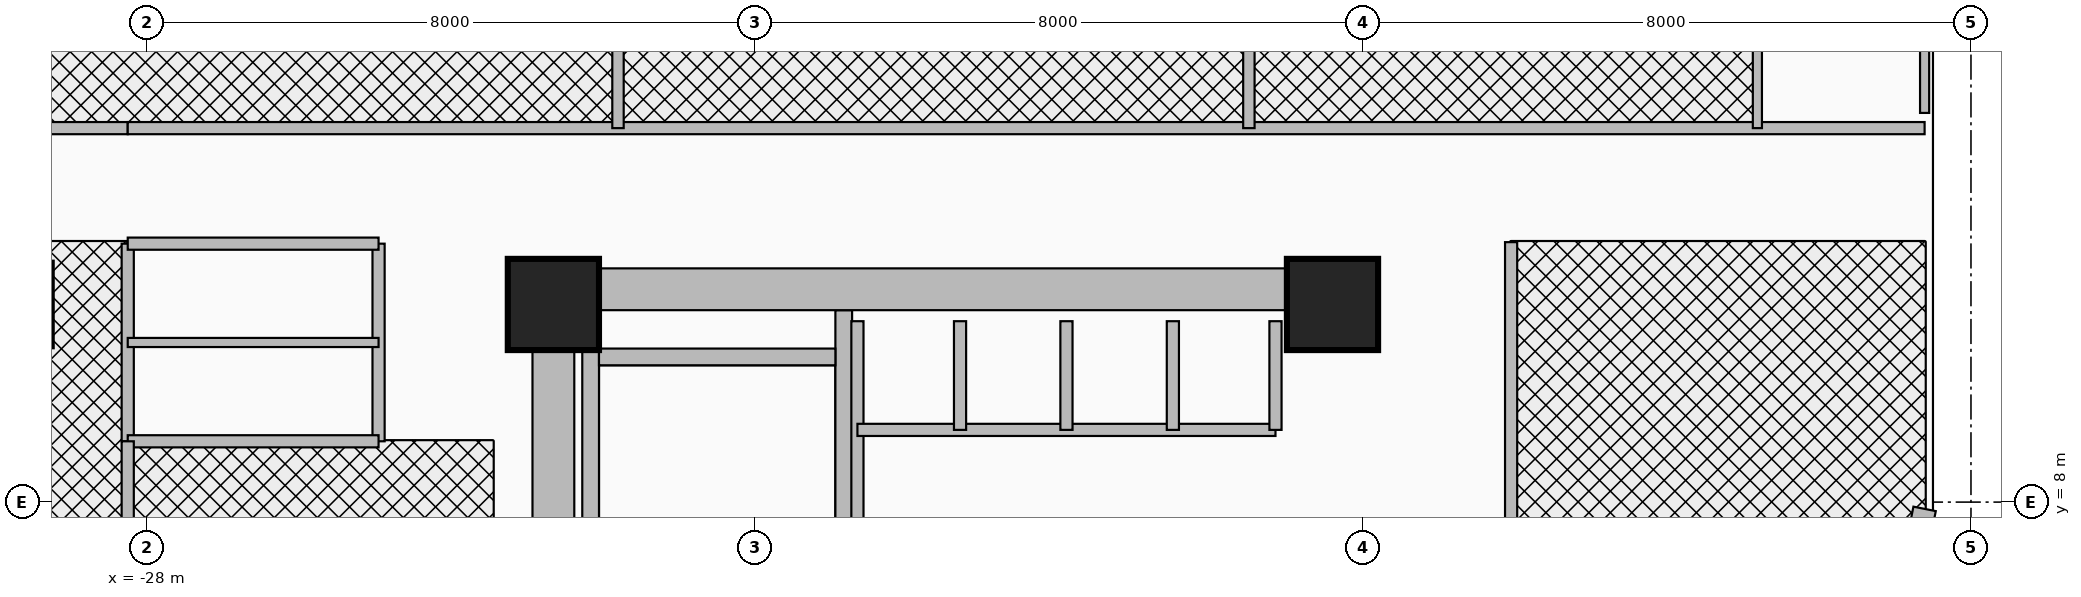
"""IFC4 building model, lengths in metres.
Left out: names, types, materials, properties, quantities, classifications, styles, units other than length and angle.
Written with IfcOpenShell. Run it as: python <this file> out.ifc"""

import sys

from ifc_helpers import new_model, si_unit, direction, frame, frame_2d, origin, origin_2d, place, context, subcontext, project, spatial, rectangle, extrude, source, transform, mapped, element, fill, save


model = new_model("IFC4")
c1 = context("Model", 3, precision=1e-05, world=origin(), true_north=direction((0.0, 1.0)))
c2 = subcontext(c1, "Body", "Model", "MODEL_VIEW")
j1 = project(units=[si_unit("LENGTHUNIT", "METRE"), si_unit("PLANEANGLEUNIT", "RADIAN")], contexts=[c1])
p1 = place(None, origin())
s1 = spatial("IfcSite", under=j1, at=p1, CompositionType="ELEMENT")
p2 = place(p1, origin())
s2 = spatial("IfcBuilding", under=s1, at=p2, CompositionType="ELEMENT")
p3 = place(p2, frame((0.0, 0.0, 153.8)))
s3 = spatial("IfcBuildingStorey", under=s2, at=p3, CompositionType="ELEMENT", Elevation=153.8)
for number, where, z_axis, x_axis in (
    (1, (-22.16, 1.78, 0.0), (0.0, 0.0, 1.0), (0.0, 1.0, 0.0)),
    (2, (-18.83, 1.78, 0.0), (0.0, 0.0, 1.0), (0.0, 1.0, 0.0)),
):
    element("IfcWall", number, at=place(p3, frame(where, z_axis=z_axis, x_axis=x_axis)), inside=s3, PredefinedType="SHEAR", context=c2, shape_type="SweptSolid", body=[
        extrude(rectangle(XDim=8.745, YDim=0.22, at=frame_2d((4.373, 0.0))), origin(), (0.0, 0.0, 1.0), 3.46),
    ])
p4 = place(p3, frame((-22.05, 9.91, 0.0), z_axis=(0.0, 0.0, 1.0), x_axis=(1.0, 0.0, 0.0)))
e3 = element("IfcWall", 3, at=p4, inside=s3, PredefinedType="SHEAR", context=c2, shape_type="SweptSolid", body=[
    extrude(rectangle(XDim=3.11, YDim=0.22, at=frame_2d((1.555, 0.0))), origin(), (0.0, 0.0, 1.0), 3.46),
])
p5 = place(p3, frame((-22.65, -11.075, 0.0), z_axis=(0.0, 0.0, 1.0), x_axis=(0.0, 1.0, 0.0)))
e4 = element("IfcWall", 4, at=p5, inside=s3, PredefinedType="SHEAR", context=c2, shape_type="SweptSolid", body=[
    extrude(rectangle(XDim=22.15, YDim=0.55, at=frame_2d((11.075, 0.0))), origin(), (0.0, 0.0, 1.0), 3.46),
])
p6 = place(p3, frame((-22.65, 10.8, 0.0), z_axis=(0.0, 0.0, 1.0), x_axis=(1.0, 0.0, 0.0)))
e5 = element("IfcWall", 5, at=p6, inside=s3, PredefinedType="SHEAR", context=c2, shape_type="SweptSolid", body=[
    extrude(rectangle(XDim=10.25, YDim=0.55, at=frame_2d((5.125, 0.0))), origin(), (0.0, 0.0, 1.0), 3.46),
])
m1 = source(origin(), c2, "Body", "SweptSolid", [
    extrude(rectangle(XDim=1.2, YDim=1.2, at=origin_2d()), origin(), (0.0, 0.0, 1.0), 3.7),
])
for number, where, z_axis, x_axis in (
    (6, (-22.65, 10.6, 0.0), (0.0, 0.0, 1.0), (1.0, 0.0, 0.0)),
    (7, (-12.4, 10.6, 0.0), (0.0, 0.0, 1.0), (1.0, 0.0, 0.0)),
):
    element("IfcColumn", number, at=place(p3, frame(where, z_axis=z_axis, x_axis=x_axis)), inside=s3, PredefinedType="COLUMN", context=c2, shape_type="MappedRepresentation", body=[
        mapped(m1, transform((0.0, 0.0, 0.0), x_axis=(1.0, 0.0, 0.0), y_axis=(0.0, 1.0, 0.0), z_axis=(0.0, 0.0, 1.0), scale=1.0)),
    ])
p7 = place(p3, frame((-4.61, 7.911, 0.0), z_axis=(0.0, 0.0, 1.0), x_axis=(-0.194989739953, -0.980805282058, 0.0)))
e8 = element("IfcWall", 8, at=p7, inside=s3, PredefinedType="SOLIDWALL", context=c2, shape_type="SweptSolid", body=[
    extrude(rectangle(XDim=0.709, YDim=0.3, at=frame_2d((0.354, 0.0))), origin(), (0.0, 0.0, 1.0), 3.46),
])
p8 = place(p3, frame((-18.65, 7.45, 0.0), z_axis=(0.0, 0.0, 1.0), x_axis=(0.0, 1.0, 0.0)))
e9 = element("IfcWall", 9, at=p8, inside=s3, PredefinedType="PARTITIONING", context=c2, shape_type="SweptSolid", body=[
    extrude(rectangle(XDim=2.93, YDim=0.16, at=frame_2d((1.465, 0.0))), origin(), (0.0, 0.0, 1.0), 3.46),
])
p9 = place(p3, frame((-18.65, 8.95, 0.0), z_axis=(0.0, 0.0, 1.0), x_axis=(1.0, 0.0, 0.0)))
e10 = element("IfcWall", 10, at=p9, inside=s3, PredefinedType="PARTITIONING", context=c2, shape_type="SweptSolid", body=[
    extrude(rectangle(XDim=5.5, YDim=0.16, at=frame_2d((2.75, 0.0))), origin(), (0.0, 0.0, 1.0), 3.46),
])
p10 = place(p9, frame((0.3, 0.0, 0.0)))
e11 = element("IfcOpeningElement", 11, at=p10, cuts=e10, PredefinedType="OPENING", context=c2, shape_type="SweptSolid", body=[
    extrude(rectangle(XDim=0.85, YDim=2.05, at=frame_2d((0.425, 1.025))), frame((0.0, 0.095, 0.0), z_axis=(0.0, -1.0, 0.0), x_axis=(1.0, 0.0, 0.0)), (0.0, 0.0, 1.0), 0.19),
])
p11 = place(p9, frame((1.55, 0.0, 0.0)))
e12 = element("IfcOpeningElement", 12, at=p11, cuts=e10, PredefinedType="OPENING", context=c2, shape_type="SweptSolid", body=[
    extrude(rectangle(XDim=0.85, YDim=2.05, at=frame_2d((0.425, 1.025))), frame((0.0, 0.095, 0.0), z_axis=(0.0, -1.0, 0.0), x_axis=(1.0, 0.0, 0.0)), (0.0, 0.0, 1.0), 0.19),
])
p12 = place(p9, frame((2.95, 0.0, 0.0)))
e13 = element("IfcOpeningElement", 13, at=p12, cuts=e10, PredefinedType="OPENING", context=c2, shape_type="SweptSolid", body=[
    extrude(rectangle(XDim=0.85, YDim=2.05, at=frame_2d((0.425, 1.025))), frame((0.0, 0.095, 0.0), z_axis=(0.0, -1.0, 0.0), x_axis=(1.0, 0.0, 0.0)), (0.0, 0.0, 1.0), 0.19),
])
p13 = place(p9, frame((4.35, 0.0, 0.0)))
e14 = element("IfcOpeningElement", 14, at=p13, cuts=e10, PredefinedType="OPENING", context=c2, shape_type="SweptSolid", body=[
    extrude(rectangle(XDim=0.85, YDim=2.05, at=frame_2d((0.425, 1.025))), frame((0.0, 0.095, 0.0), z_axis=(0.0, -1.0, 0.0), x_axis=(1.0, 0.0, 0.0)), (0.0, 0.0, 1.0), 0.19),
])
for number, where, z_axis, x_axis in (
    (15, (-13.15, 8.95, 0.0), (0.0, 0.0, 1.0), (0.0, 1.0, 0.0)),
    (16, (-17.3, 8.95, 0.0), (0.0, 0.0, 1.0), (0.0, 1.0, 0.0)),
    (17, (-15.9, 8.95, 0.0), (0.0, 0.0, 1.0), (0.0, 1.0, 0.0)),
    (18, (-14.5, 8.95, 0.0), (0.0, 0.0, 1.0), (0.0, 1.0, 0.0)),
):
    element("IfcWall", number, at=place(p3, frame(where, z_axis=z_axis, x_axis=x_axis)), inside=s3, PredefinedType="PARTITIONING", context=c2, shape_type="SweptSolid", body=[
        extrude(rectangle(XDim=1.43, YDim=0.16, at=frame_2d((0.715, 0.0))), origin(), (0.0, 0.0, 1.0), 3.46),
    ])
p14 = place(p3, frame((-28.25, 8.8, 0.0), z_axis=(0.0, 0.0, 1.0), x_axis=(0.0, 1.0, 0.0)))
e19 = element("IfcWall", 19, at=p14, inside=s3, PredefinedType="PARTITIONING", context=c2, shape_type="SweptSolid", body=[
    extrude(rectangle(XDim=2.6, YDim=0.16, at=frame_2d((1.3, 0.0))), origin(), (0.0, 0.0, 1.0), 2.666),
])
p15 = place(p3, frame((-24.95, 8.8, 0.0), z_axis=(0.0, 0.0, 1.0), x_axis=(0.0, 1.0, 0.0)))
e20 = element("IfcWall", 20, at=p15, inside=s3, PredefinedType="PARTITIONING", context=c2, shape_type="SweptSolid", body=[
    extrude(rectangle(XDim=2.6, YDim=0.16, at=frame_2d((1.3, 0.0))), origin(), (0.0, 0.0, 1.0), 2.666),
])
p16 = place(p15, frame((0.3, 0.0, 0.0)))
e21 = element("IfcOpeningElement", 21, at=p16, cuts=e20, PredefinedType="OPENING", context=c2, shape_type="SweptSolid", body=[
    extrude(rectangle(XDim=0.85, YDim=2.1, at=frame_2d((0.425, 1.05))), frame((0.0, 0.095, 0.0), z_axis=(0.0, -1.0, 0.0), x_axis=(1.0, 0.0, 0.0)), (0.0, 0.0, 1.0), 0.19),
])
p17 = place(p15, frame((1.45, 0.0, 0.0)))
e22 = element("IfcOpeningElement", 22, at=p17, cuts=e20, PredefinedType="OPENING", context=c2, shape_type="SweptSolid", body=[
    extrude(rectangle(XDim=0.85, YDim=2.1, at=frame_2d((0.425, 1.05))), frame((0.0, 0.095, 0.0), z_axis=(0.0, -1.0, 0.0), x_axis=(1.0, 0.0, 0.0)), (0.0, 0.0, 1.0), 0.19),
])
for number, where, z_axis, x_axis in (
    (23, (-28.25, 8.8, 0.0), (0.0, 0.0, 1.0), (1.0, 0.0, 0.0)),
    (24, (-28.25, 11.4, 0.0), (0.0, 0.0, 1.0), (1.0, 0.0, 0.0)),
):
    element("IfcWall", number, at=place(p3, frame(where, z_axis=z_axis, x_axis=x_axis)), inside=s3, PredefinedType="PARTITIONING", context=c2, shape_type="SweptSolid", body=[
        extrude(rectangle(XDim=3.3, YDim=0.16, at=frame_2d((1.65, 0.0))), origin(), (0.0, 0.0, 1.0), 3.46),
    ])
p18 = place(p3, frame((-28.25, 10.1, 0.0), z_axis=(0.0, 0.0, 1.0), x_axis=(1.0, 0.0, 0.0)))
e25 = element("IfcWall", 25, at=p18, inside=s3, PredefinedType="PARTITIONING", context=c2, shape_type="SweptSolid", body=[
    extrude(rectangle(XDim=3.3, YDim=0.12, at=frame_2d((1.65, 0.0))), origin(), (0.0, 0.0, 1.0), 3.46),
])
p19 = place(p3, frame((-28.25, 7.2, 0.0), z_axis=(0.0, 0.0, 1.0), x_axis=(0.0, 1.0, 0.0)))
e26 = element("IfcWall", 26, at=p19, inside=s3, PredefinedType="PARTITIONING", context=c2, shape_type="SweptSolid", body=[
    extrude(rectangle(XDim=1.6, YDim=0.16, at=frame_2d((0.8, 0.0))), origin(), (0.0, 0.0, 1.0), 2.988),
])
p20 = place(p3, frame((-32.54, 12.92, 0.0), z_axis=(0.0, 0.0, 1.0), x_axis=(1.0, 0.0, 0.0)))
e27 = element("IfcWall", 27, at=p20, inside=s3, PredefinedType="PARTITIONING", context=c2, shape_type="SweptSolid", body=[
    extrude(rectangle(XDim=4.29, YDim=0.16, at=frame_2d((2.145, 0.0))), origin(), (0.0, 0.0, 1.0), 2.896),
])
p21 = place(p3, frame((-28.25, 12.92, 0.0), z_axis=(0.0, 0.0, 1.0), x_axis=(1.0, 0.0, 0.0)))
e28 = element("IfcWall", 28, at=p21, inside=s3, PredefinedType="PARTITIONING", context=c2, shape_type="SweptSolid", body=[
    extrude(rectangle(XDim=23.64, YDim=0.16, at=frame_2d((11.82, 0.0))), origin(), (0.0, 0.0, 1.0), 2.834),
])
p22 = place(p21, frame((2.75, 0.0, 0.0)))
e29 = element("IfcOpeningElement", 29, at=p22, cuts=e28, PredefinedType="OPENING", context=c2, shape_type="SweptSolid", body=[
    extrude(rectangle(XDim=0.95, YDim=2.15, at=frame_2d((0.475, 1.075))), frame((0.0, 0.095, 0.0), z_axis=(0.0, -1.0, 0.0), x_axis=(1.0, 0.0, 0.0)), (0.0, 0.0, 1.0), 0.19),
])
p23 = place(p21, frame((10.125, 0.0, 0.0)))
e30 = element("IfcOpeningElement", 30, at=p23, cuts=e28, PredefinedType="OPENING", context=c2, shape_type="SweptSolid", body=[
    extrude(rectangle(XDim=0.95, YDim=2.15, at=frame_2d((0.475, 1.075))), frame((0.0, 0.095, 0.0), z_axis=(0.0, -1.0, 0.0), x_axis=(1.0, 0.0, 0.0)), (0.0, 0.0, 1.0), 0.19),
])
p24 = place(p21, frame((17.62, 0.0, 0.0)))
e31 = element("IfcOpeningElement", 31, at=p24, cuts=e28, PredefinedType="OPENING", context=c2, shape_type="SweptSolid", body=[
    extrude(rectangle(XDim=0.95, YDim=2.15, at=frame_2d((0.475, 1.075))), frame((0.0, 0.095, 0.0), z_axis=(0.0, -1.0, 0.0), x_axis=(1.0, 0.0, 0.0)), (0.0, 0.0, 1.0), 0.19),
])
p25 = place(p3, frame((-21.8, 12.92, 0.0), z_axis=(0.0, 0.0, 1.0), x_axis=(0.0, 1.0, 0.0)))
e32 = element("IfcWall", 32, at=p25, inside=s3, PredefinedType="PARTITIONING", context=c2, shape_type="SweptSolid", body=[
    extrude(rectangle(XDim=6.256, YDim=0.15, at=frame_2d((3.128, 0.0))), origin(), (0.0, 0.0, 1.0), 2.666),
])
p26 = place(p3, frame((-13.5, 12.92, 0.0), z_axis=(0.0, 0.0, 1.0), x_axis=(0.0, 1.0, 0.0)))
e33 = element("IfcWall", 33, at=p26, inside=s3, PredefinedType="PARTITIONING", context=c2, shape_type="SweptSolid", body=[
    extrude(rectangle(XDim=6.694, YDim=0.15, at=frame_2d((3.347, 0.0))), origin(), (0.0, 0.0, 1.0), 2.666),
])
p27 = place(p3, frame((-6.81, 12.92, 0.0), z_axis=(0.0, 0.0, 1.0), x_axis=(0.0, 1.0, 0.0)))
e34 = element("IfcWall", 34, at=p27, inside=s3, PredefinedType="PARTITIONING", context=c2, shape_type="SweptSolid", body=[
    extrude(rectangle(XDim=2.0, YDim=0.12, at=frame_2d((1.0, 0.0))), origin(), (0.0, 0.0, 1.0), 3.46),
])
p28 = place(p3, frame((-4.61, 13.12, 0.0), z_axis=(0.0, 0.0, 1.0), x_axis=(0.0, 1.0, 0.0)))
e35 = element("IfcWall", 35, at=p28, inside=s3, PredefinedType="PARTITIONING", context=c2, shape_type="SweptSolid", body=[
    extrude(rectangle(XDim=1.62, YDim=0.12, at=frame_2d((0.81, 0.0))), origin(), (0.0, 0.0, 1.0), 3.46),
])
p29 = place(p3, frame((-10.05, 6.0, 0.0), z_axis=(0.0, 0.0, 1.0), x_axis=(0.0, 1.0, 0.0)))
e36 = element("IfcWall", 36, at=p29, inside=s3, PredefinedType="PARTITIONING", context=c2, shape_type="SweptSolid", body=[
    extrude(rectangle(XDim=5.42, YDim=0.16, at=frame_2d((2.71, 0.0))), origin(), (0.0, 0.0, 1.0), 3.46),
])
p30 = place(p29, frame((2.26, 0.0, 0.0)))
e37 = element("IfcOpeningElement", 37, at=p30, cuts=e36, PredefinedType="OPENING", context=c2, shape_type="SweptSolid", body=[
    extrude(rectangle(XDim=0.9, YDim=2.1, at=frame_2d((0.45, 1.05))), frame((0.0, 0.095, 0.0), z_axis=(0.0, -1.0, 0.0), x_axis=(1.0, 0.0, 0.0)), (0.0, 0.0, 1.0), 0.19),
])
p31 = place(p10, origin())
e38 = element("IfcDoor", 38, at=p31, inside=s3, OperationType="SINGLE_SWING_LEFT", PredefinedType="DOOR", context=c2, shape_type="SweptSolid", body=[
    extrude(rectangle(XDim=0.85, YDim=2.05, at=frame_2d((0.425, 1.025))), frame((0.0, 0.025, 0.0), z_axis=(0.0, -1.0, 0.0), x_axis=(1.0, 0.0, 0.0)), (0.0, 0.0, 1.0), 0.05),
])
fill(e11, e38)
p32 = place(p11, origin())
e39 = element("IfcDoor", 39, at=p32, inside=s3, OperationType="SINGLE_SWING_RIGHT", PredefinedType="DOOR", context=c2, shape_type="SweptSolid", body=[
    extrude(rectangle(XDim=0.85, YDim=2.05, at=frame_2d((0.425, 1.025))), frame((0.0, 0.025, 0.0), z_axis=(0.0, -1.0, 0.0), x_axis=(1.0, 0.0, 0.0)), (0.0, 0.0, 1.0), 0.05),
])
fill(e12, e39)
p33 = place(p12, origin())
e40 = element("IfcDoor", 40, at=p33, inside=s3, OperationType="SINGLE_SWING_LEFT", PredefinedType="DOOR", context=c2, shape_type="SweptSolid", body=[
    extrude(rectangle(XDim=0.85, YDim=2.05, at=frame_2d((0.425, 1.025))), frame((0.0, 0.025, 0.0), z_axis=(0.0, -1.0, 0.0), x_axis=(1.0, 0.0, 0.0)), (0.0, 0.0, 1.0), 0.05),
])
fill(e13, e40)
p34 = place(p13, origin())
e41 = element("IfcDoor", 41, at=p34, inside=s3, OperationType="SINGLE_SWING_RIGHT", PredefinedType="DOOR", context=c2, shape_type="SweptSolid", body=[
    extrude(rectangle(XDim=0.85, YDim=2.05, at=frame_2d((0.425, 1.025))), frame((0.0, 0.025, 0.0), z_axis=(0.0, -1.0, 0.0), x_axis=(1.0, 0.0, 0.0)), (0.0, 0.0, 1.0), 0.05),
])
fill(e14, e41)
p35 = place(p16, origin())
e42 = element("IfcDoor", 42, at=p35, inside=s3, OperationType="SINGLE_SWING_RIGHT", PredefinedType="DOOR", context=c2, shape_type="SweptSolid", body=[
    extrude(rectangle(XDim=0.85, YDim=2.1, at=frame_2d((0.425, 1.05))), frame((0.0, 0.025, 0.0), z_axis=(0.0, -1.0, 0.0), x_axis=(1.0, 0.0, 0.0)), (0.0, 0.0, 1.0), 0.05),
])
fill(e21, e42)
p36 = place(p17, origin())
e43 = element("IfcDoor", 43, at=p36, inside=s3, OperationType="SINGLE_SWING_LEFT", PredefinedType="DOOR", context=c2, shape_type="SweptSolid", body=[
    extrude(rectangle(XDim=0.85, YDim=2.1, at=frame_2d((0.425, 1.05))), frame((0.0, 0.025, 0.0), z_axis=(0.0, -1.0, 0.0), x_axis=(1.0, 0.0, 0.0)), (0.0, 0.0, 1.0), 0.05),
])
fill(e22, e43)
p37 = place(p22, frame((0.95, 0.0, 0.0), z_axis=(0.0, 0.0, 1.0), x_axis=(-1.0, 0.0, 0.0)))
e44 = element("IfcDoor", 44, at=p37, inside=s3, OperationType="SINGLE_SWING_LEFT", PredefinedType="DOOR", context=c2, shape_type="SweptSolid", body=[
    extrude(rectangle(XDim=0.95, YDim=2.15, at=frame_2d((0.475, 1.075))), frame((0.0, 0.025, 0.0), z_axis=(0.0, -1.0, 0.0), x_axis=(1.0, 0.0, 0.0)), (0.0, 0.0, 1.0), 0.05),
])
fill(e29, e44)
p38 = place(p23, frame((0.95, 0.0, 0.0), z_axis=(0.0, 0.0, 1.0), x_axis=(-1.0, 0.0, 0.0)))
e45 = element("IfcDoor", 45, at=p38, inside=s3, OperationType="SINGLE_SWING_LEFT", PredefinedType="DOOR", context=c2, shape_type="SweptSolid", body=[
    extrude(rectangle(XDim=0.95, YDim=2.15, at=frame_2d((0.475, 1.075))), frame((0.0, 0.025, 0.0), z_axis=(0.0, -1.0, 0.0), x_axis=(1.0, 0.0, 0.0)), (0.0, 0.0, 1.0), 0.05),
])
fill(e30, e45)
p39 = place(p24, frame((0.95, 0.0, 0.0), z_axis=(0.0, 0.0, 1.0), x_axis=(-1.0, 0.0, 0.0)))
e46 = element("IfcDoor", 46, at=p39, inside=s3, OperationType="SINGLE_SWING_LEFT", PredefinedType="DOOR", context=c2, shape_type="SweptSolid", body=[
    extrude(rectangle(XDim=0.95, YDim=2.15, at=frame_2d((0.475, 1.075))), frame((0.0, 0.025, 0.0), z_axis=(0.0, -1.0, 0.0), x_axis=(1.0, 0.0, 0.0)), (0.0, 0.0, 1.0), 0.05),
])
fill(e31, e46)
p40 = place(p30, frame((0.9, 0.0, 0.0), z_axis=(0.0, 0.0, 1.0), x_axis=(-1.0, 0.0, 0.0)))
e47 = element("IfcDoor", 47, at=p40, inside=s3, OperationType="SINGLE_SWING_LEFT", PredefinedType="DOOR", context=c2, shape_type="SweptSolid", body=[
    extrude(rectangle(XDim=0.9, YDim=2.1, at=frame_2d((0.45, 1.05))), frame((0.0, 0.025, 0.0), z_axis=(0.0, -1.0, 0.0), x_axis=(1.0, 0.0, 0.0)), (0.0, 0.0, 1.0), 0.05),
])
fill(e37, e47)
save(model, sys.argv[1])
